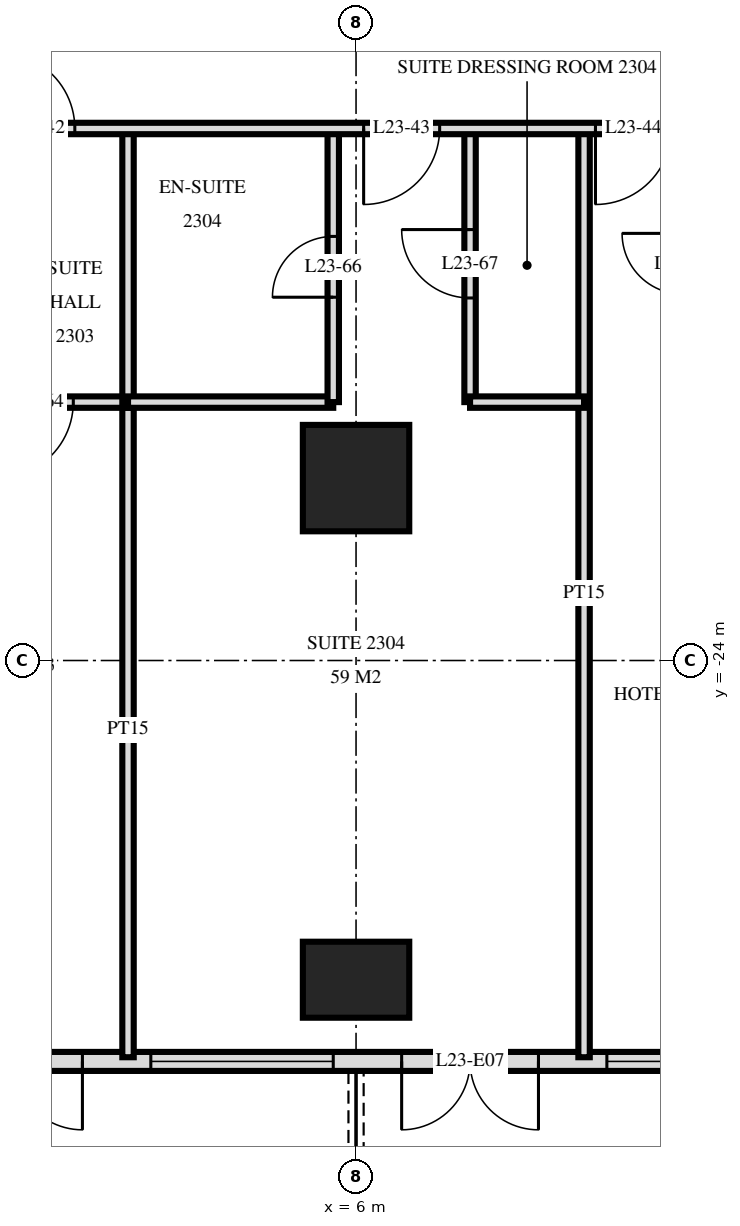
"""IFC4 building model, lengths in metres.
Left out: names, types, materials, properties, quantities, classifications, styles, units other than length and angle.
Written with IfcOpenShell. Run it as: python <this file> out.ifc"""

import sys

from ifc_helpers import new_model, si_unit, direction, frame, frame_2d, origin, origin_2d, place, context, subcontext, project, spatial, rectangle, extrude, element, fill, save


model = new_model("IFC4")
c1 = context("Model", 3, precision=1e-05, world=origin(), true_north=direction((0.0, 1.0)))
c2 = subcontext(c1, "Body", "Model", "MODEL_VIEW")
j1 = project(units=[si_unit("LENGTHUNIT", "METRE"), si_unit("PLANEANGLEUNIT", "RADIAN")], contexts=[c1])
p1 = place(None, origin())
s1 = spatial("IfcSite", under=j1, at=p1, CompositionType="ELEMENT")
p2 = place(p1, origin())
s2 = spatial("IfcBuilding", under=s1, at=p2, CompositionType="ELEMENT")
p3 = place(p2, frame((0.0, 0.0, 92.4)))
s3 = spatial("IfcBuildingStorey", under=s2, at=p3, CompositionType="ELEMENT", Elevation=92.4)
p4 = place(p3, frame((6.0, -28.2, 0.0), z_axis=(0.0, 0.0, 1.0), x_axis=(1.0, 0.0, 0.0)))
e1 = element("IfcColumn", 1, at=p4, inside=s3, PredefinedType="COLUMN", context=c2, shape_type="SweptSolid", body=[
    extrude(rectangle(XDim=1.4, YDim=1.0, at=origin_2d()), origin(), (0.0, 0.0, 1.0), 3.6),
])
p5 = place(p3, frame((6.0, -21.6, 0.0), z_axis=(0.0, 0.0, 1.0), x_axis=(1.0, 0.0, 0.0)))
e2 = element("IfcColumn", 2, at=p5, inside=s3, PredefinedType="COLUMN", context=c2, shape_type="SweptSolid", body=[
    extrude(rectangle(XDim=1.4, YDim=1.4, at=origin_2d()), origin(), (0.0, 0.0, 1.0), 3.6),
])
p6 = place(p3, frame((-28.775, -29.275, 0.0), z_axis=(0.0, 0.0, 1.0), x_axis=(1.0, 0.0, 0.0)))
e3 = element("IfcWall", 3, at=p6, inside=s3, PredefinedType="SOLIDWALL", context=c2, shape_type="SweptSolid", body=[
    extrude(rectangle(XDim=57.551, YDim=0.25, at=frame_2d((28.775, 0.0))), origin(), (0.0, 0.0, 1.0), 3.32),
])
p7 = place(p6, frame((0.575, 0.0, 0.0)))
e4 = element("IfcOpeningElement", 4, at=p7, cuts=e3, PredefinedType="OPENING", context=c2, shape_type="SweptSolid", body=[
    extrude(rectangle(XDim=1.8, YDim=2.4, at=frame_2d((0.9, 1.2))), frame((0.0, 0.135, 0.0), z_axis=(0.0, -1.0, 0.0), x_axis=(1.0, 0.0, 0.0)), (0.0, 0.0, 1.0), 0.27),
])
p8 = place(p6, frame((5.075, 0.0, 0.3)))
e5 = element("IfcOpeningElement", 5, at=p8, cuts=e3, PredefinedType="OPENING", context=c2, shape_type="SweptSolid", body=[
    extrude(rectangle(XDim=2.4, YDim=2.1, at=frame_2d((1.2, 1.05))), frame((0.0, 0.135, 0.0), z_axis=(0.0, -1.0, 0.0), x_axis=(1.0, 0.0, 0.0)), (0.0, 0.0, 1.0), 0.27),
])
p9 = place(p6, frame((8.375, 0.0, 0.0)))
e6 = element("IfcOpeningElement", 6, at=p9, cuts=e3, PredefinedType="OPENING", context=c2, shape_type="SweptSolid", body=[
    extrude(rectangle(XDim=1.8, YDim=2.4, at=frame_2d((0.9, 1.2))), frame((0.0, 0.135, 0.0), z_axis=(0.0, -1.0, 0.0), x_axis=(1.0, 0.0, 0.0)), (0.0, 0.0, 1.0), 0.27),
])
p10 = place(p6, frame((11.375, 0.0, 0.0)))
e7 = element("IfcOpeningElement", 7, at=p10, cuts=e3, PredefinedType="OPENING", context=c2, shape_type="SweptSolid", body=[
    extrude(rectangle(XDim=1.8, YDim=2.4, at=frame_2d((0.9, 1.2))), frame((0.0, 0.135, 0.0), z_axis=(0.0, -1.0, 0.0), x_axis=(1.0, 0.0, 0.0)), (0.0, 0.0, 1.0), 0.27),
])
p11 = place(p6, frame((14.075, 0.0, 0.3)))
e8 = element("IfcOpeningElement", 8, at=p11, cuts=e3, PredefinedType="OPENING", context=c2, shape_type="SweptSolid", body=[
    extrude(rectangle(XDim=2.4, YDim=2.1, at=frame_2d((1.2, 1.05))), frame((0.0, 0.135, 0.0), z_axis=(0.0, -1.0, 0.0), x_axis=(1.0, 0.0, 0.0)), (0.0, 0.0, 1.0), 0.27),
])
p12 = place(p6, frame((17.375, 0.0, 0.0)))
e9 = element("IfcOpeningElement", 9, at=p12, cuts=e3, PredefinedType="OPENING", context=c2, shape_type="SweptSolid", body=[
    extrude(rectangle(XDim=1.8, YDim=2.4, at=frame_2d((0.9, 1.2))), frame((0.0, 0.135, 0.0), z_axis=(0.0, -1.0, 0.0), x_axis=(1.0, 0.0, 0.0)), (0.0, 0.0, 1.0), 0.27),
])
p13 = place(p6, frame((20.075, 0.0, 0.3)))
e10 = element("IfcOpeningElement", 10, at=p13, cuts=e3, PredefinedType="OPENING", context=c2, shape_type="SweptSolid", body=[
    extrude(rectangle(XDim=2.4, YDim=2.1, at=frame_2d((1.2, 1.05))), frame((0.0, 0.135, 0.0), z_axis=(0.0, -1.0, 0.0), x_axis=(1.0, 0.0, 0.0)), (0.0, 0.0, 1.0), 0.27),
])
p14 = place(p6, frame((23.075, 0.0, 0.3)))
e11 = element("IfcOpeningElement", 11, at=p14, cuts=e3, PredefinedType="OPENING", context=c2, shape_type="SweptSolid", body=[
    extrude(rectangle(XDim=2.4, YDim=2.1, at=frame_2d((1.2, 1.05))), frame((0.0, 0.135, 0.0), z_axis=(0.0, -1.0, 0.0), x_axis=(1.0, 0.0, 0.0)), (0.0, 0.0, 1.0), 0.27),
])
p15 = place(p6, frame((26.375, 0.0, 0.0)))
e12 = element("IfcOpeningElement", 12, at=p15, cuts=e3, PredefinedType="OPENING", context=c2, shape_type="SweptSolid", body=[
    extrude(rectangle(XDim=1.8, YDim=2.4, at=frame_2d((0.9, 1.2))), frame((0.0, 0.135, 0.0), z_axis=(0.0, -1.0, 0.0), x_axis=(1.0, 0.0, 0.0)), (0.0, 0.0, 1.0), 0.27),
])
p16 = place(p6, frame((29.375, 0.0, 0.0)))
e13 = element("IfcOpeningElement", 13, at=p16, cuts=e3, PredefinedType="OPENING", context=c2, shape_type="SweptSolid", body=[
    extrude(rectangle(XDim=1.8, YDim=2.4, at=frame_2d((0.9, 1.2))), frame((0.0, 0.135, 0.0), z_axis=(0.0, -1.0, 0.0), x_axis=(1.0, 0.0, 0.0)), (0.0, 0.0, 1.0), 0.27),
])
p17 = place(p6, frame((32.075, 0.0, 0.3)))
e14 = element("IfcOpeningElement", 14, at=p17, cuts=e3, PredefinedType="OPENING", context=c2, shape_type="SweptSolid", body=[
    extrude(rectangle(XDim=2.4, YDim=2.1, at=frame_2d((1.2, 1.05))), frame((0.0, 0.135, 0.0), z_axis=(0.0, -1.0, 0.0), x_axis=(1.0, 0.0, 0.0)), (0.0, 0.0, 1.0), 0.27),
])
p18 = place(p6, frame((35.375, 0.0, 0.0)))
e15 = element("IfcOpeningElement", 15, at=p18, cuts=e3, PredefinedType="OPENING", context=c2, shape_type="SweptSolid", body=[
    extrude(rectangle(XDim=1.8, YDim=2.4, at=frame_2d((0.9, 1.2))), frame((0.0, 0.135, 0.0), z_axis=(0.0, -1.0, 0.0), x_axis=(1.0, 0.0, 0.0)), (0.0, 0.0, 1.0), 0.27),
])
p19 = place(p6, frame((38.075, 0.0, 0.3)))
e16 = element("IfcOpeningElement", 16, at=p19, cuts=e3, PredefinedType="OPENING", context=c2, shape_type="SweptSolid", body=[
    extrude(rectangle(XDim=2.4, YDim=2.1, at=frame_2d((1.2, 1.05))), frame((0.0, 0.135, 0.0), z_axis=(0.0, -1.0, 0.0), x_axis=(1.0, 0.0, 0.0)), (0.0, 0.0, 1.0), 0.27),
])
p20 = place(p6, frame((41.075, 0.0, 0.3)))
e17 = element("IfcOpeningElement", 17, at=p20, cuts=e3, PredefinedType="OPENING", context=c2, shape_type="SweptSolid", body=[
    extrude(rectangle(XDim=2.4, YDim=2.1, at=frame_2d((1.2, 1.05))), frame((0.0, 0.135, 0.0), z_axis=(0.0, -1.0, 0.0), x_axis=(1.0, 0.0, 0.0)), (0.0, 0.0, 1.0), 0.27),
])
p21 = place(p6, frame((44.375, 0.0, 0.0)))
e18 = element("IfcOpeningElement", 18, at=p21, cuts=e3, PredefinedType="OPENING", context=c2, shape_type="SweptSolid", body=[
    extrude(rectangle(XDim=1.8, YDim=2.4, at=frame_2d((0.9, 1.2))), frame((0.0, 0.135, 0.0), z_axis=(0.0, -1.0, 0.0), x_axis=(1.0, 0.0, 0.0)), (0.0, 0.0, 1.0), 0.27),
])
p22 = place(p6, frame((47.075, 0.0, 0.3)))
e19 = element("IfcOpeningElement", 19, at=p22, cuts=e3, PredefinedType="OPENING", context=c2, shape_type="SweptSolid", body=[
    extrude(rectangle(XDim=2.4, YDim=2.1, at=frame_2d((1.2, 1.05))), frame((0.0, 0.135, 0.0), z_axis=(0.0, -1.0, 0.0), x_axis=(1.0, 0.0, 0.0)), (0.0, 0.0, 1.0), 0.27),
])
p23 = place(p6, frame((50.375, 0.0, 0.0)))
e20 = element("IfcOpeningElement", 20, at=p23, cuts=e3, PredefinedType="OPENING", context=c2, shape_type="SweptSolid", body=[
    extrude(rectangle(XDim=1.8, YDim=2.4, at=frame_2d((0.9, 1.2))), frame((0.0, 0.135, 0.0), z_axis=(0.0, -1.0, 0.0), x_axis=(1.0, 0.0, 0.0)), (0.0, 0.0, 1.0), 0.27),
])
p24 = place(p6, frame((53.375, 0.0, 0.0)))
e21 = element("IfcOpeningElement", 21, at=p24, cuts=e3, PredefinedType="OPENING", context=c2, shape_type="SweptSolid", body=[
    extrude(rectangle(XDim=1.8, YDim=2.4, at=frame_2d((0.9, 1.2))), frame((0.0, 0.135, 0.0), z_axis=(0.0, -1.0, 0.0), x_axis=(1.0, 0.0, 0.0)), (0.0, 0.0, 1.0), 0.27),
])
p25 = place(p3, frame((9.0, -29.22, 0.0), z_axis=(0.0, 0.0, 1.0), x_axis=(0.0, 1.0, 0.0)))
e22 = element("IfcWall", 22, at=p25, inside=s3, PredefinedType="PARTITIONING", context=c2, shape_type="SweptSolid", body=[
    extrude(rectangle(XDim=12.22, YDim=0.15, at=frame_2d((6.11, 0.0))), origin(), (0.0, 0.0, 1.0), 3.32),
])
p26 = place(p3, frame((7.5, -20.6, 0.0), z_axis=(0.0, 0.0, 1.0), x_axis=(0.0, 1.0, 0.0)))
e23 = element("IfcWall", 23, at=p26, inside=s3, PredefinedType="PARTITIONING", context=c2, shape_type="SweptSolid", body=[
    extrude(rectangle(XDim=3.6, YDim=0.15, at=frame_2d((1.8, 0.0))), origin(), (0.0, 0.0, 1.0), 3.32),
])
p27 = place(p26, frame((1.37, 0.0, 0.0)))
e24 = element("IfcOpeningElement", 24, at=p27, cuts=e23, PredefinedType="OPENING", context=c2, shape_type="SweptSolid", body=[
    extrude(rectangle(XDim=0.9, YDim=2.1, at=frame_2d((0.45, 1.05))), frame((0.0, 0.085, 0.0), z_axis=(0.0, -1.0, 0.0), x_axis=(1.0, 0.0, 0.0)), (0.0, 0.0, 1.0), 0.17),
])
p28 = place(p3, frame((5.7, -20.6, 0.0), z_axis=(0.0, 0.0, 1.0), x_axis=(0.0, 1.0, 0.0)))
e25 = element("IfcWall", 25, at=p28, inside=s3, PredefinedType="PARTITIONING", context=c2, shape_type="SweptSolid", body=[
    extrude(rectangle(XDim=3.6, YDim=0.15, at=frame_2d((1.8, 0.0))), origin(), (0.0, 0.0, 1.0), 3.32),
])
p29 = place(p28, frame((1.38, 0.0, 0.0)))
e26 = element("IfcOpeningElement", 26, at=p29, cuts=e25, PredefinedType="OPENING", context=c2, shape_type="SweptSolid", body=[
    extrude(rectangle(XDim=0.8, YDim=2.1, at=frame_2d((0.4, 1.05))), frame((0.0, 0.085, 0.0), z_axis=(0.0, -1.0, 0.0), x_axis=(1.0, 0.0, 0.0)), (0.0, 0.0, 1.0), 0.17),
])
p30 = place(p3, frame((3.0, -20.6, 0.0), z_axis=(0.0, 0.0, 1.0), x_axis=(0.0, 1.0, 0.0)))
e27 = element("IfcWall", 27, at=p30, inside=s3, PredefinedType="PARTITIONING", context=c2, shape_type="SweptSolid", body=[
    extrude(rectangle(XDim=3.6, YDim=0.15, at=frame_2d((1.8, 0.0))), origin(), (0.0, 0.0, 1.0), 3.32),
])
p31 = place(p3, frame((3.0, -29.22, 0.0), z_axis=(0.0, 0.0, 1.0), x_axis=(0.0, 1.0, 0.0)))
e28 = element("IfcWall", 28, at=p31, inside=s3, PredefinedType="PARTITIONING", context=c2, shape_type="SweptSolid", body=[
    extrude(rectangle(XDim=8.62, YDim=0.15, at=frame_2d((4.31, 0.0))), origin(), (0.0, 0.0, 1.0), 3.32),
])
p32 = place(p3, frame((0.6, -20.6, 0.0), z_axis=(0.0, 0.0, 1.0), x_axis=(1.0, 0.0, 0.0)))
e29 = element("IfcWall", 29, at=p32, inside=s3, PredefinedType="PARTITIONING", context=c2, shape_type="SweptSolid", body=[
    extrude(rectangle(XDim=2.4, YDim=0.15, at=frame_2d((1.2, 0.0))), origin(), (0.0, 0.0, 1.0), 3.32),
])
p33 = place(p32, frame((0.68, 0.0, 0.0)))
e30 = element("IfcOpeningElement", 30, at=p33, cuts=e29, PredefinedType="OPENING", context=c2, shape_type="SweptSolid", body=[
    extrude(rectangle(XDim=1.0, YDim=2.1, at=frame_2d((0.5, 1.05))), frame((0.0, 0.085, 0.0), z_axis=(0.0, -1.0, 0.0), x_axis=(1.0, 0.0, 0.0)), (0.0, 0.0, 1.0), 0.17),
])
p34 = place(p3, frame((3.0, -20.6, 0.0), z_axis=(0.0, 0.0, 1.0), x_axis=(1.0, 0.0, 0.0)))
e31 = element("IfcWall", 31, at=p34, inside=s3, PredefinedType="PARTITIONING", context=c2, shape_type="SweptSolid", body=[
    extrude(rectangle(XDim=2.7, YDim=0.15, at=frame_2d((1.35, 0.0))), origin(), (0.0, 0.0, 1.0), 3.32),
])
p35 = place(p3, frame((7.5, -20.6, 0.0), z_axis=(0.0, 0.0, 1.0), x_axis=(1.0, 0.0, 0.0)))
e32 = element("IfcWall", 32, at=p35, inside=s3, PredefinedType="PARTITIONING", context=c2, shape_type="SweptSolid", body=[
    extrude(rectangle(XDim=1.5, YDim=0.15, at=frame_2d((0.75, 0.0))), origin(), (0.0, 0.0, 1.0), 3.32),
])
p36 = place(p3, frame((-33.12, -17.0, 0.0), z_axis=(0.0, 0.0, 1.0), x_axis=(1.0, 0.0, 0.0)))
e33 = element("IfcWall", 33, at=p36, inside=s3, PredefinedType="PARTITIONING", context=c2, shape_type="SweptSolid", body=[
    extrude(rectangle(XDim=66.24, YDim=0.15, at=frame_2d((33.12, 0.0))), origin(), (0.0, 0.0, 1.0), 3.32),
])
p37 = place(p36, frame((16.27, 0.0, 0.0)))
e34 = element("IfcOpeningElement", 34, at=p37, cuts=e33, PredefinedType="OPENING", context=c2, shape_type="SweptSolid", body=[
    extrude(rectangle(XDim=1.0, YDim=2.1, at=frame_2d((0.5, 1.05))), frame((0.0, 0.085, 0.0), z_axis=(0.0, -1.0, 0.0), x_axis=(1.0, 0.0, 0.0)), (0.0, 0.0, 1.0), 0.17),
])
p38 = place(p36, frame((22.97, 0.0, 0.0)))
e35 = element("IfcOpeningElement", 35, at=p38, cuts=e33, PredefinedType="OPENING", context=c2, shape_type="SweptSolid", body=[
    extrude(rectangle(XDim=1.0, YDim=2.1, at=frame_2d((0.5, 1.05))), frame((0.0, 0.085, 0.0), z_axis=(0.0, -1.0, 0.0), x_axis=(1.0, 0.0, 0.0)), (0.0, 0.0, 1.0), 0.17),
])
p39 = place(p36, frame((34.42, 0.0, 0.0)))
e36 = element("IfcOpeningElement", 36, at=p39, cuts=e33, PredefinedType="OPENING", context=c2, shape_type="SweptSolid", body=[
    extrude(rectangle(XDim=1.0, YDim=2.1, at=frame_2d((0.5, 1.05))), frame((0.0, 0.085, 0.0), z_axis=(0.0, -1.0, 0.0), x_axis=(1.0, 0.0, 0.0)), (0.0, 0.0, 1.0), 0.17),
])
p40 = place(p36, frame((39.22, 0.0, 0.0)))
e37 = element("IfcOpeningElement", 37, at=p40, cuts=e33, PredefinedType="OPENING", context=c2, shape_type="SweptSolid", body=[
    extrude(rectangle(XDim=1.0, YDim=2.1, at=frame_2d((0.5, 1.05))), frame((0.0, 0.085, 0.0), z_axis=(0.0, -1.0, 0.0), x_axis=(1.0, 0.0, 0.0)), (0.0, 0.0, 1.0), 0.17),
])
p41 = place(p36, frame((42.27, 0.0, 0.0)))
e38 = element("IfcOpeningElement", 38, at=p41, cuts=e33, PredefinedType="OPENING", context=c2, shape_type="SweptSolid", body=[
    extrude(rectangle(XDim=1.0, YDim=2.1, at=frame_2d((0.5, 1.05))), frame((0.0, 0.085, 0.0), z_axis=(0.0, -1.0, 0.0), x_axis=(1.0, 0.0, 0.0)), (0.0, 0.0, 1.0), 0.17),
])
p42 = place(p36, frame((45.82, 0.0, 0.0)))
e39 = element("IfcOpeningElement", 39, at=p42, cuts=e33, PredefinedType="OPENING", context=c2, shape_type="SweptSolid", body=[
    extrude(rectangle(XDim=1.0, YDim=2.1, at=frame_2d((0.5, 1.05))), frame((0.0, 0.085, 0.0), z_axis=(0.0, -1.0, 0.0), x_axis=(1.0, 0.0, 0.0)), (0.0, 0.0, 1.0), 0.17),
])
p43 = place(p36, frame((13.42, 0.0, 0.0)))
e40 = element("IfcOpeningElement", 40, at=p43, cuts=e33, PredefinedType="OPENING", context=c2, shape_type="SweptSolid", body=[
    extrude(rectangle(XDim=1.0, YDim=2.1, at=frame_2d((0.5, 1.05))), frame((0.0, 0.085, 0.0), z_axis=(0.0, -1.0, 0.0), x_axis=(1.0, 0.0, 0.0)), (0.0, 0.0, 1.0), 0.17),
])
p44 = place(p36, frame((54.82, 0.0, 0.0)))
e41 = element("IfcOpeningElement", 41, at=p44, cuts=e33, PredefinedType="OPENING", context=c2, shape_type="SweptSolid", body=[
    extrude(rectangle(XDim=1.0, YDim=2.1, at=frame_2d((0.5, 1.05))), frame((0.0, 0.085, 0.0), z_axis=(0.0, -1.0, 0.0), x_axis=(1.0, 0.0, 0.0)), (0.0, 0.0, 1.0), 0.17),
])
p45 = place(p16, frame((0.9, 0.0, 0.0), z_axis=(0.0, 0.0, 1.0), x_axis=(-1.0, 0.0, 0.0)))
e42 = element("IfcDoor", 42, at=p45, inside=s3, OperationType="DOUBLE_DOOR_SINGLE_SWING", PredefinedType="DOOR", context=c2, shape_type="SweptSolid", body=[
    extrude(rectangle(XDim=1.8, YDim=2.4, at=frame_2d((0.0, 1.2))), frame((0.0, -0.025, 0.0), z_axis=(0.0, 1.0, 0.0), x_axis=(-1.0, 0.0, 0.0)), (0.0, 0.0, 1.0), 0.05),
])
fill(e13, e42)
p46 = place(p17, origin())
e43 = element("IfcWindow", 43, at=p46, inside=s3, PartitioningType="SINGLE_PANEL", PredefinedType="WINDOW", context=c2, shape_type="SweptSolid", body=[
    extrude(rectangle(XDim=2.4, YDim=2.1, at=frame_2d((1.2, 1.05))), frame((0.0, 0.03, 0.0), z_axis=(0.0, -1.0, 0.0), x_axis=(1.0, 0.0, 0.0)), (0.0, 0.0, 1.0), 0.06),
])
fill(e14, e43)
p47 = place(p18, frame((0.9, 0.0, 0.0), z_axis=(0.0, 0.0, 1.0), x_axis=(-1.0, 0.0, 0.0)))
e44 = element("IfcDoor", 44, at=p47, inside=s3, OperationType="DOUBLE_DOOR_SINGLE_SWING", PredefinedType="DOOR", context=c2, shape_type="SweptSolid", body=[
    extrude(rectangle(XDim=1.8, YDim=2.4, at=frame_2d((0.0, 1.2))), frame((0.0, -0.025, 0.0), z_axis=(0.0, 1.0, 0.0), x_axis=(-1.0, 0.0, 0.0)), (0.0, 0.0, 1.0), 0.05),
])
fill(e15, e44)
p48 = place(p19, origin())
e45 = element("IfcWindow", 45, at=p48, inside=s3, PartitioningType="SINGLE_PANEL", PredefinedType="WINDOW", context=c2, shape_type="SweptSolid", body=[
    extrude(rectangle(XDim=2.4, YDim=2.1, at=frame_2d((1.2, 1.05))), frame((0.0, 0.03, 0.0), z_axis=(0.0, -1.0, 0.0), x_axis=(1.0, 0.0, 0.0)), (0.0, 0.0, 1.0), 0.06),
])
fill(e16, e45)
p49 = place(p39, origin())
e46 = element("IfcDoor", 46, at=p49, inside=s3, OperationType="SINGLE_SWING_RIGHT", PredefinedType="DOOR", context=c2, shape_type="SweptSolid", body=[
    extrude(rectangle(XDim=1.0, YDim=2.1, at=frame_2d((0.5, 1.05))), frame((0.0, 0.025, 0.0), z_axis=(0.0, -1.0, 0.0), x_axis=(1.0, 0.0, 0.0)), (0.0, 0.0, 1.0), 0.05),
])
fill(e36, e46)
p50 = place(p40, frame((0.5, 0.0, 0.0), z_axis=(0.0, 0.0, 1.0), x_axis=(-1.0, 0.0, 0.0)))
e47 = element("IfcDoor", 47, at=p50, inside=s3, OperationType="SINGLE_SWING_LEFT", PredefinedType="DOOR", context=c2, shape_type="SweptSolid", body=[
    extrude(rectangle(XDim=1.0, YDim=2.1, at=frame_2d((0.0, 1.05))), frame((0.0, -0.025, 0.0), z_axis=(0.0, 1.0, 0.0), x_axis=(-1.0, 0.0, 0.0)), (0.0, 0.0, 1.0), 0.05),
])
fill(e37, e47)
p51 = place(p41, frame((0.5, 0.0, 0.0), z_axis=(0.0, 0.0, 1.0), x_axis=(-1.0, 0.0, 0.0)))
e48 = element("IfcDoor", 48, at=p51, inside=s3, OperationType="SINGLE_SWING_LEFT", PredefinedType="DOOR", context=c2, shape_type="SweptSolid", body=[
    extrude(rectangle(XDim=1.0, YDim=2.1, at=frame_2d((0.0, 1.05))), frame((0.0, -0.025, 0.0), z_axis=(0.0, 1.0, 0.0), x_axis=(-1.0, 0.0, 0.0)), (0.0, 0.0, 1.0), 0.05),
])
fill(e38, e48)
p52 = place(p33, frame((0.5, 0.0, 0.0), z_axis=(0.0, 0.0, 1.0), x_axis=(-1.0, 0.0, 0.0)))
e49 = element("IfcDoor", 49, at=p52, inside=s3, OperationType="SINGLE_SWING_LEFT", PredefinedType="DOOR", context=c2, shape_type="SweptSolid", body=[
    extrude(rectangle(XDim=1.0, YDim=2.1, at=frame_2d((0.0, 1.05))), frame((0.0, -0.025, 0.0), z_axis=(0.0, 1.0, 0.0), x_axis=(-1.0, 0.0, 0.0)), (0.0, 0.0, 1.0), 0.05),
])
fill(e30, e49)
p53 = place(p29, origin())
e50 = element("IfcDoor", 50, at=p53, inside=s3, OperationType="SINGLE_SWING_RIGHT", PredefinedType="DOOR", context=c2, shape_type="SweptSolid", body=[
    extrude(rectangle(XDim=0.8, YDim=2.1, at=frame_2d((0.4, 1.05))), frame((0.0, 0.025, 0.0), z_axis=(0.0, -1.0, 0.0), x_axis=(1.0, 0.0, 0.0)), (0.0, 0.0, 1.0), 0.05),
])
fill(e26, e50)
p54 = place(p27, origin())
e51 = element("IfcDoor", 51, at=p54, inside=s3, OperationType="SINGLE_SWING_LEFT", PredefinedType="DOOR", context=c2, shape_type="SweptSolid", body=[
    extrude(rectangle(XDim=0.9, YDim=2.1, at=frame_2d((0.45, 1.05))), frame((0.0, 0.025, 0.0), z_axis=(0.0, -1.0, 0.0), x_axis=(1.0, 0.0, 0.0)), (0.0, 0.0, 1.0), 0.05),
])
fill(e24, e51)
save(model, sys.argv[1])
